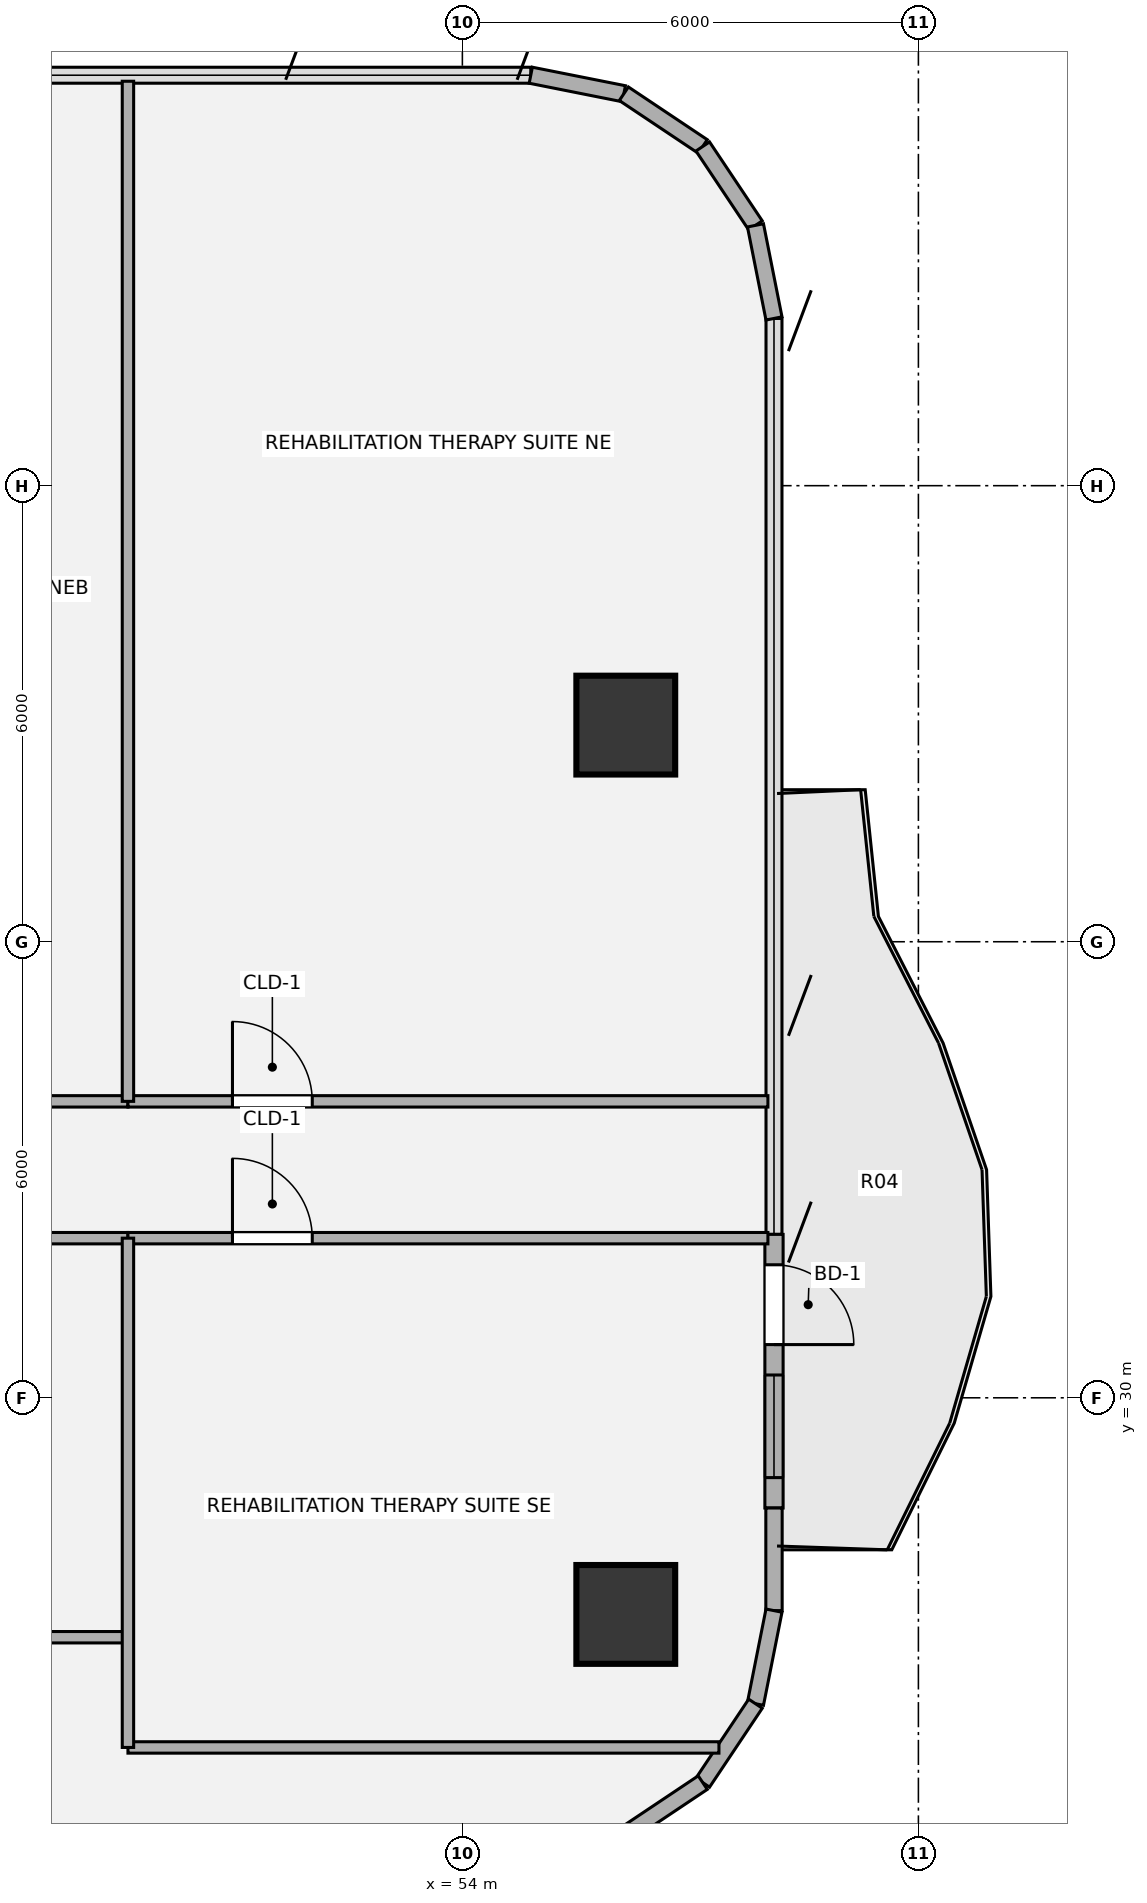
"""IFC4 building model, lengths in metres.
Left out: names, types, materials, properties, quantities, classifications, styles, units other than length and angle.
Written with IfcOpenShell. Run it as: python <this file> out.ifc"""

import sys

from ifc_helpers import new_model, si_unit, direction, frame, frame_2d, origin, origin_2d, place, context, subcontext, project, spatial, rectangle, hollow_circle, extrude, source, transform, mapped, element, fill, save


model = new_model("IFC4")
c1 = context("Model", 3, precision=1e-05, world=origin(), true_north=direction((0.0, 1.0)))
c2 = subcontext(c1, "Body", "Model", "MODEL_VIEW")
j1 = project(units=[si_unit("LENGTHUNIT", "METRE"), si_unit("PLANEANGLEUNIT", "RADIAN")], contexts=[c1])
p1 = place(None, origin())
s1 = spatial("IfcSite", under=j1, at=p1, CompositionType="ELEMENT")
p2 = place(p1, origin())
s2 = spatial("IfcBuilding", under=s1, at=p2, CompositionType="ELEMENT")
p3 = place(p2, frame((0.0, 0.0, 108.72)))
s3 = spatial("IfcBuildingStorey", under=s2, at=p3, CompositionType="ELEMENT", Elevation=108.72)
m1 = source(origin(), c2, "Body", "SweptSolid", [
    extrude(hollow_circle(Radius=0.65, WallThickness=0.045, at=origin_2d()), origin(), (0.0, 0.0, 1.0), 3.78),
])
for number, where, z_axis, x_axis in (
    (1, (56.15, 27.15, 0.0), (0.0, 0.0, 1.0), (1.0, 0.0, 0.0)),
    (2, (56.15, 38.85, 0.0), (0.0, 0.0, 1.0), (1.0, 0.0, 0.0)),
):
    element("IfcColumn", number, at=place(p3, frame(where, z_axis=z_axis, x_axis=x_axis)), inside=s3, PredefinedType="COLUMN", context=c2, shape_type="MappedRepresentation", body=[
        mapped(m1, transform((0.0, 0.0, 0.0), x_axis=(1.0, 0.0, 0.0), y_axis=(0.0, 1.0, 0.0), z_axis=(0.0, 0.0, 1.0), scale=1.0)),
    ])
for number, where, z_axis, x_axis in (
    (3, (54.9, 47.4, 0.0), (0.0, 0.0, 1.0), (0.981, -0.195, 0.0)),
    (4, (56.125, 47.156, 0.0), (0.0, 0.0, 1.0), (0.831, -0.556, 0.0)),
    (5, (57.163, 46.463, 0.0), (0.0, 0.0, 1.0), (0.556, -0.831, 0.0)),
    (6, (57.856, 45.425, 0.0), (0.0, 0.0, 1.0), (0.195, -0.981, 0.0)),
):
    element("IfcWall", number, at=place(p3, frame(where, z_axis=z_axis, x_axis=x_axis)), inside=s3, PredefinedType="SOLIDWALL", context=c2, shape_type="SweptSolid", body=[
        extrude(rectangle(XDim=1.249, YDim=0.215, at=frame_2d((0.624, 0.0))), origin(), (0.0, 0.0, 1.0), 3.53),
    ])
p4 = place(p3, frame((58.1, 32.15, 0.0), z_axis=(0.0, 0.0, 1.0), x_axis=(0.0, -1.0, 0.0)))
e7 = element("IfcWall", 7, at=p4, inside=s3, PredefinedType="SOLIDWALL", context=c2, shape_type="SweptSolid", body=[
    extrude(rectangle(XDim=3.6, YDim=0.24, at=frame_2d((1.8, 0.0))), origin(), (0.0, 0.0, 1.0), 3.53),
])
p5 = place(p4, frame((0.4, 0.0, 0.0)))
e8 = element("IfcOpeningElement", 8, at=p5, cuts=e7, PredefinedType="OPENING", context=c2, shape_type="SweptSolid", body=[
    extrude(rectangle(XDim=1.05, YDim=2.15, at=origin_2d()), frame((0.525, 0.13, 1.075), z_axis=(0.0, -1.0, 0.0), x_axis=(1.0, 0.0, 0.0)), (0.0, 0.0, 1.0), 0.26),
])
p6 = place(p4, frame((1.85, 0.0, 0.85)))
e9 = element("IfcOpeningElement", 9, at=p6, cuts=e7, PredefinedType="OPENING", context=c2, shape_type="SweptSolid", body=[
    extrude(rectangle(XDim=1.35, YDim=1.35, at=origin_2d()), frame((0.675, 0.13, 0.675), z_axis=(0.0, -1.0, 0.0), x_axis=(1.0, 0.0, 0.0)), (0.0, 0.0, 1.0), 0.26),
])
p7 = place(p3, frame((58.1, 28.55, 0.0), z_axis=(0.0, 0.0, 1.0), x_axis=(0.0, -1.0, 0.0)))
e10 = element("IfcWall", 10, at=p7, inside=s3, PredefinedType="SOLIDWALL", context=c2, shape_type="SweptSolid", body=[
    extrude(rectangle(XDim=1.35, YDim=0.215, at=frame_2d((0.675, 0.0))), origin(), (0.0, 0.0, 1.0), 3.53),
])
for number, where, z_axis, x_axis in (
    (11, (58.1, 27.2, 0.0), (0.0, 0.0, 1.0), (-0.195, -0.981, 0.0)),
    (12, (57.856, 25.975, 0.0), (0.0, 0.0, 1.0), (-0.556, -0.831, 0.0)),
    (13, (57.163, 24.937, 0.0), (0.0, 0.0, 1.0), (-0.831, -0.556, 0.0)),
):
    element("IfcWall", number, at=place(p3, frame(where, z_axis=z_axis, x_axis=x_axis)), inside=s3, PredefinedType="SOLIDWALL", context=c2, shape_type="SweptSolid", body=[
        extrude(rectangle(XDim=1.249, YDim=0.215, at=frame_2d((0.624, 0.0))), origin(), (0.0, 0.0, 1.0), 3.53),
    ])
p8 = place(p3, frame((49.6, 25.4, 0.0), z_axis=(0.0, 0.0, 1.0), x_axis=(1.0, 0.0, 0.0)))
e14 = element("IfcWall", 14, at=p8, inside=s3, PredefinedType="PARTITIONING", context=c2, shape_type="SweptSolid", body=[
    extrude(rectangle(XDim=7.776, YDim=0.15, at=frame_2d((3.888, 0.0))), origin(), (0.0, 0.0, 1.0), 3.5),
])
p9 = place(p3, frame((43.5, 26.85, 0.0), z_axis=(0.0, 0.0, 1.0), x_axis=(1.0, 0.0, 0.0)))
e15 = element("IfcWall", 15, at=p9, inside=s3, PredefinedType="PARTITIONING", context=c2, shape_type="SweptSolid", body=[
    extrude(rectangle(XDim=6.1, YDim=0.15, at=frame_2d((3.05, 0.0))), origin(), (0.0, 0.0, 1.0), 3.055),
])
p10 = place(p3, frame((43.5, 32.1, 0.0), z_axis=(0.0, 0.0, 1.0), x_axis=(1.0, 0.0, 0.0)))
e16 = element("IfcWall", 16, at=p10, inside=s3, PredefinedType="PARTITIONING", context=c2, shape_type="SweptSolid", body=[
    extrude(rectangle(XDim=6.1, YDim=0.15, at=frame_2d((3.05, 0.0))), origin(), (0.0, 0.0, 1.0), 2.982),
])
p11 = place(p10, frame((2.525, 0.0, 0.0)))
e17 = element("IfcOpeningElement", 17, at=p11, cuts=e16, PredefinedType="OPENING", context=c2, shape_type="SweptSolid", body=[
    extrude(rectangle(XDim=1.05, YDim=2.1, at=origin_2d()), frame((0.525, 0.085, 1.05), z_axis=(0.0, -1.0, 0.0), x_axis=(1.0, 0.0, 0.0)), (0.0, 0.0, 1.0), 0.17),
])
p12 = place(p3, frame((49.6, 32.1, 0.0), z_axis=(0.0, 0.0, 1.0), x_axis=(1.0, 0.0, 0.0)))
e18 = element("IfcWall", 18, at=p12, inside=s3, PredefinedType="PARTITIONING", context=c2, shape_type="SweptSolid", body=[
    extrude(rectangle(XDim=8.42, YDim=0.15, at=frame_2d((4.21, 0.0))), origin(), (0.0, 0.0, 1.0), 2.982),
])
p13 = place(p12, frame((1.375, 0.0, 0.0)))
e19 = element("IfcOpeningElement", 19, at=p13, cuts=e18, PredefinedType="OPENING", context=c2, shape_type="SweptSolid", body=[
    extrude(rectangle(XDim=1.05, YDim=2.1, at=origin_2d()), frame((0.525, 0.085, 1.05), z_axis=(0.0, -1.0, 0.0), x_axis=(1.0, 0.0, 0.0)), (0.0, 0.0, 1.0), 0.17),
])
p14 = place(p3, frame((43.5, 33.9, 0.0), z_axis=(0.0, 0.0, 1.0), x_axis=(1.0, 0.0, 0.0)))
e20 = element("IfcWall", 20, at=p14, inside=s3, PredefinedType="PARTITIONING", context=c2, shape_type="SweptSolid", body=[
    extrude(rectangle(XDim=6.1, YDim=0.15, at=frame_2d((3.05, 0.0))), origin(), (0.0, 0.0, 1.0), 2.982),
])
p15 = place(p14, frame((2.525, 0.0, 0.0)))
e21 = element("IfcOpeningElement", 21, at=p15, cuts=e20, PredefinedType="OPENING", context=c2, shape_type="SweptSolid", body=[
    extrude(rectangle(XDim=1.05, YDim=2.1, at=origin_2d()), frame((0.525, 0.085, 1.05), z_axis=(0.0, -1.0, 0.0), x_axis=(1.0, 0.0, 0.0)), (0.0, 0.0, 1.0), 0.17),
])
p16 = place(p3, frame((49.6, 33.9, 0.0), z_axis=(0.0, 0.0, 1.0), x_axis=(1.0, 0.0, 0.0)))
e22 = element("IfcWall", 22, at=p16, inside=s3, PredefinedType="PARTITIONING", context=c2, shape_type="SweptSolid", body=[
    extrude(rectangle(XDim=8.42, YDim=0.15, at=frame_2d((4.21, 0.0))), origin(), (0.0, 0.0, 1.0), 2.982),
])
p17 = place(p16, frame((1.375, 0.0, 0.0)))
e23 = element("IfcOpeningElement", 23, at=p17, cuts=e22, PredefinedType="OPENING", context=c2, shape_type="SweptSolid", body=[
    extrude(rectangle(XDim=1.05, YDim=2.1, at=origin_2d()), frame((0.525, 0.085, 1.05), z_axis=(0.0, -1.0, 0.0), x_axis=(1.0, 0.0, 0.0)), (0.0, 0.0, 1.0), 0.17),
])
p18 = place(p3, frame((49.6, 25.4, 0.0), z_axis=(0.0, 0.0, 1.0), x_axis=(0.0, 1.0, 0.0)))
e24 = element("IfcWall", 24, at=p18, inside=s3, PredefinedType="PARTITIONING", context=c2, shape_type="SweptSolid", body=[
    extrude(rectangle(XDim=6.7, YDim=0.15, at=frame_2d((3.35, 0.0))), origin(), (0.0, 0.0, 1.0), 3.5),
])
p19 = place(p3, frame((49.6, 33.9, 0.0), z_axis=(0.0, 0.0, 1.0), x_axis=(0.0, 1.0, 0.0)))
e25 = element("IfcWall", 25, at=p19, inside=s3, PredefinedType="PARTITIONING", context=c2, shape_type="SweptSolid", body=[
    extrude(rectangle(XDim=13.421, YDim=0.15, at=frame_2d((6.71, 0.0))), origin(), (0.0, 0.0, 1.0), 3.5),
])
m2 = source(origin(), c2, "Body", "SweptSolid", [
    extrude(rectangle(XDim=1.05, YDim=2.15, at=origin_2d()), frame((0.525, 0.025, 1.075), z_axis=(0.0, -1.0, 0.0), x_axis=(1.0, 0.0, 0.0)), (0.0, 0.0, 1.0), 0.05),
])
p20 = place(p5, origin())
e26 = element("IfcDoor", 26, at=p20, inside=s3, OperationType="SINGLE_SWING_RIGHT", PredefinedType="DOOR", context=c2, shape_type="MappedRepresentation", body=[
    mapped(m2, transform((0.0, 0.0, 0.0), x_axis=(1.0, 0.0, 0.0), y_axis=(0.0, 1.0, 0.0), z_axis=(0.0, 0.0, 1.0), scale=1.0)),
])
fill(e8, e26)
m3 = source(origin(), c2, "Body", "SweptSolid", [
    extrude(rectangle(XDim=1.35, YDim=1.35, at=origin_2d()), frame((0.675, 0.03, 0.675), z_axis=(0.0, -1.0, 0.0), x_axis=(1.0, 0.0, 0.0)), (0.0, 0.0, 1.0), 0.06),
])
p21 = place(p6, origin())
e27 = element("IfcWindow", 27, at=p21, inside=s3, PartitioningType="SINGLE_PANEL", PredefinedType="WINDOW", context=c2, shape_type="MappedRepresentation", body=[
    mapped(m3, transform((0.0, 0.0, 0.0), x_axis=(1.0, 0.0, 0.0), y_axis=(0.0, 1.0, 0.0), z_axis=(0.0, 0.0, 1.0), scale=1.0)),
])
fill(e9, e27)
m4 = source(origin(), c2, "Body", "SweptSolid", [
    extrude(rectangle(XDim=1.05, YDim=2.1, at=origin_2d()), frame((0.525, 0.025, 1.05), z_axis=(0.0, -1.0, 0.0), x_axis=(1.0, 0.0, 0.0)), (0.0, 0.0, 1.0), 0.05),
])
p22 = place(p13, origin())
e28 = element("IfcDoor", 28, at=p22, inside=s3, OperationType="SINGLE_SWING_LEFT", PredefinedType="DOOR", context=c2, shape_type="MappedRepresentation", body=[
    mapped(m4, transform((0.0, 0.0, 0.0), x_axis=(1.0, 0.0, 0.0), y_axis=(0.0, 1.0, 0.0), z_axis=(0.0, 0.0, 1.0), scale=1.0)),
])
fill(e19, e28)
p23 = place(p17, origin())
e29 = element("IfcDoor", 29, at=p23, inside=s3, OperationType="SINGLE_SWING_LEFT", PredefinedType="DOOR", context=c2, shape_type="MappedRepresentation", body=[
    mapped(m4, transform((0.0, 0.0, 0.0), x_axis=(1.0, 0.0, 0.0), y_axis=(0.0, 1.0, 0.0), z_axis=(0.0, 0.0, 1.0), scale=1.0)),
])
fill(e23, e29)
save(model, sys.argv[1])
